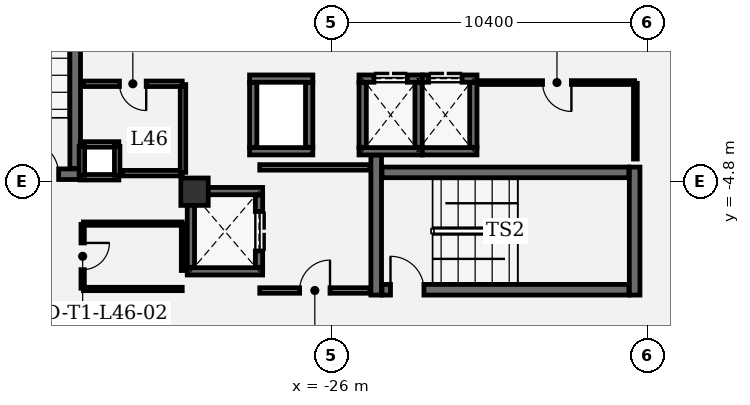
"""IFC4 building model, lengths in metres.
Left out: names, types, materials, properties, quantities, classifications, styles, units other than length and angle.
Written with IfcOpenShell. Run it as: python <this file> out.ifc"""

import sys

from ifc_helpers import new_model, si_unit, direction, frame, frame_2d, origin, origin_2d, place, context, subcontext, project, spatial, rectangle, extrude, element, fill, save


model = new_model("IFC4")
c1 = context("Model", 3, precision=1e-05, world=origin(), true_north=direction((0.0, 1.0)))
c2 = subcontext(c1, "Body", "Model", "MODEL_VIEW")
j1 = project(units=[si_unit("LENGTHUNIT", "METRE"), si_unit("PLANEANGLEUNIT", "RADIAN")], contexts=[c1])
p1 = place(None, origin())
s1 = spatial("IfcSite", under=j1, at=p1, CompositionType="ELEMENT")
p2 = place(p1, origin())
s2 = spatial("IfcBuilding", under=s1, at=p2, CompositionType="ELEMENT")
p3 = place(p2, frame((0.0, 0.0, 201.0)))
s3 = spatial("IfcBuildingStorey", under=s2, at=p3, CompositionType="ELEMENT", Elevation=201.0)
p4 = place(p3, frame((-30.5, -5.15, 0.0), z_axis=(0.0, 0.0, 1.0), x_axis=(1.0, 0.0, 0.0)))
e1 = element("IfcColumn", 1, at=p4, inside=s3, PredefinedType="COLUMN", context=c2, shape_type="SweptSolid", body=[
    extrude(rectangle(XDim=0.9, YDim=0.9, at=origin_2d()), origin(), (0.0, 0.0, 1.0), 4.05),
])
p5 = place(p3, frame((-24.525, -3.94, 0.0), z_axis=(0.0, 0.0, 1.0), x_axis=(0.0, -1.0, 0.0)))
e2 = element("IfcWall", 2, at=p5, inside=s3, PredefinedType="SHEAR", context=c2, shape_type="SweptSolid", body=[
    extrude(rectangle(XDim=4.61, YDim=0.35, at=frame_2d((2.305, 0.0))), origin(), (0.0, 0.0, 1.0), 3.78),
])
p6 = place(p3, frame((-16.025, -8.55, 0.0), z_axis=(0.0, 0.0, 1.0), x_axis=(0.0, 1.0, 0.0)))
e3 = element("IfcWall", 3, at=p6, inside=s3, PredefinedType="SHEAR", context=c2, shape_type="SweptSolid", body=[
    extrude(rectangle(XDim=4.21, YDim=0.35, at=frame_2d((2.105, 0.0))), origin(), (0.0, 0.0, 1.0), 3.78),
])
p7 = place(p3, frame((-24.335, -8.375, 0.0), z_axis=(0.0, 0.0, 1.0), x_axis=(1.0, 0.0, 0.0)))
e4 = element("IfcWall", 4, at=p7, inside=s3, PredefinedType="SHEAR", context=c2, shape_type="SweptSolid", body=[
    extrude(rectangle(XDim=8.12, YDim=0.35, at=frame_2d((4.06, 0.0))), origin(), (0.0, 0.0, 1.0), 3.78),
])
p8 = place(p7, frame((0.28, 0.0, 0.0)))
e5 = element("IfcOpeningElement", 5, at=p8, cuts=e4, PredefinedType="OPENING", context=c2, shape_type="SweptSolid", body=[
    extrude(rectangle(XDim=1.1, YDim=2.2, at=frame_2d((0.55, 1.1))), frame((0.0, 0.185, 0.0), z_axis=(0.0, -1.0, 0.0), x_axis=(1.0, 0.0, 0.0)), (0.0, 0.0, 1.0), 0.37),
])
p9 = place(p3, frame((-16.215, -4.515, 0.0), z_axis=(0.0, 0.0, 1.0), x_axis=(-1.0, 0.0, 0.0)))
e6 = element("IfcWall", 6, at=p9, inside=s3, PredefinedType="SHEAR", context=c2, shape_type="SweptSolid", body=[
    extrude(rectangle(XDim=8.12, YDim=0.35, at=frame_2d((4.06, 0.0))), origin(), (0.0, 0.0, 1.0), 3.78),
])
p10 = place(p3, frame((-38.46, -4.575, 0.0), z_axis=(0.0, 0.0, 1.0), x_axis=(1.0, 0.0, 0.0)))
e7 = element("IfcWall", 7, at=p10, inside=s3, PredefinedType="SHEAR", context=c2, shape_type="SweptSolid", body=[
    extrude(rectangle(XDim=4.21, YDim=0.35, at=frame_2d((2.105, 0.0))), origin(), (0.0, 0.0, 1.0), 3.78),
])
p11 = place(p10, frame((2.39, 0.0, 0.0)))
e8 = element("IfcOpeningElement", 8, at=p11, cuts=e7, PredefinedType="OPENING", context=c2, shape_type="SweptSolid", body=[
    extrude(rectangle(XDim=1.1, YDim=2.2, at=frame_2d((0.55, 1.1))), frame((0.0, 0.185, 0.0), z_axis=(0.0, -1.0, 0.0), x_axis=(1.0, 0.0, 0.0)), (0.0, 0.0, 1.0), 0.37),
])
p12 = place(p3, frame((-34.425, -4.385, 0.0), z_axis=(0.0, 0.0, 1.0), x_axis=(0.0, 1.0, 0.0)))
e9 = element("IfcWall", 9, at=p12, inside=s3, PredefinedType="SHEAR", context=c2, shape_type="SweptSolid", body=[
    extrude(rectangle(XDim=8.77, YDim=0.35, at=frame_2d((4.385, 0.0))), origin(), (0.0, 0.0, 1.0), 3.78),
])
for number, where, z_axis, x_axis in (
    (10, (-28.26, -7.77, 0.0), (0.0, 0.0, 1.0), (-1.0, 0.0, 0.0)),
    (11, (-30.74, -5.13, 0.0), (0.0, 0.0, 1.0), (1.0, 0.0, 0.0)),
):
    element("IfcWall", number, at=place(p3, frame(where, z_axis=z_axis, x_axis=x_axis)), inside=s3, PredefinedType="SHEAR", context=c2, shape_type="SweptSolid", body=[
        extrude(rectangle(XDim=2.48, YDim=0.24, at=frame_2d((1.24, 0.0))), origin(), (0.0, 0.0, 1.0), 3.78),
    ])
p13 = place(p3, frame((-30.62, -7.638, 0.0), z_axis=(0.0, 0.0, 1.0), x_axis=(0.0, 1.0, 0.0)))
e12 = element("IfcWall", 12, at=p13, inside=s3, PredefinedType="SHEAR", context=c2, shape_type="SweptSolid", body=[
    extrude(rectangle(XDim=2.376, YDim=0.24, at=frame_2d((1.188, 0.0))), origin(), (0.0, 0.0, 1.0), 3.78),
])
p14 = place(p3, frame((-28.38, -5.262, 0.0), z_axis=(0.0, 0.0, 1.0), x_axis=(0.0, -1.0, 0.0)))
e13 = element("IfcWall", 13, at=p14, inside=s3, PredefinedType="SHEAR", context=c2, shape_type="SweptSolid", body=[
    extrude(rectangle(XDim=2.376, YDim=0.24, at=frame_2d((1.188, 0.0))), origin(), (0.0, 0.0, 1.0), 3.78),
])
p15 = place(p14, frame((0.538, 0.0, 0.0)))
e14 = element("IfcOpeningElement", 14, at=p15, cuts=e13, PredefinedType="OPENING", context=c2, shape_type="SweptSolid", body=[
    extrude(rectangle(XDim=1.3, YDim=2.3, at=frame_2d((0.65, 1.15))), frame((0.0, 0.13, 0.0), z_axis=(0.0, -1.0, 0.0), x_axis=(1.0, 0.0, 0.0)), (0.0, 0.0, 1.0), 0.26),
])
for number, where, z_axis, x_axis in (
    (15, (-26.61, -3.82, 0.0), (0.0, 0.0, 1.0), (-1.0, 0.0, 0.0)),
    (16, (-28.69, -1.43, 0.0), (0.0, 0.0, 1.0), (1.0, 0.0, 0.0)),
):
    element("IfcWall", number, at=place(p3, frame(where, z_axis=z_axis, x_axis=x_axis)), inside=s3, PredefinedType="SHEAR", context=c2, shape_type="SweptSolid", body=[
        extrude(rectangle(XDim=2.08, YDim=0.24, at=frame_2d((1.04, 0.0))), origin(), (0.0, 0.0, 1.0), 3.78),
    ])
for number, where, z_axis, x_axis in (
    (17, (-28.57, -3.688, 0.0), (0.0, 0.0, 1.0), (0.0, 1.0, 0.0)),
    (18, (-26.73, -1.562, 0.0), (0.0, 0.0, 1.0), (0.0, -1.0, 0.0)),
):
    element("IfcWall", number, at=place(p3, frame(where, z_axis=z_axis, x_axis=x_axis)), inside=s3, PredefinedType="SHEAR", context=c2, shape_type="SweptSolid", body=[
        extrude(rectangle(XDim=2.126, YDim=0.24, at=frame_2d((1.063, 0.0))), origin(), (0.0, 0.0, 1.0), 3.78),
    ])
p16 = place(p3, frame((-23.01, -3.82, 0.0), z_axis=(0.0, 0.0, 1.0), x_axis=(-1.0, 0.0, 0.0)))
e19 = element("IfcWall", 19, at=p16, inside=s3, PredefinedType="SHEAR", context=c2, shape_type="SweptSolid", body=[
    extrude(rectangle(XDim=2.08, YDim=0.24, at=frame_2d((1.04, 0.0))), origin(), (0.0, 0.0, 1.0), 3.78),
])
p17 = place(p3, frame((-25.09, -1.43, 0.0), z_axis=(0.0, 0.0, 1.0), x_axis=(1.0, 0.0, 0.0)))
e20 = element("IfcWall", 20, at=p17, inside=s3, PredefinedType="SHEAR", context=c2, shape_type="SweptSolid", body=[
    extrude(rectangle(XDim=2.08, YDim=0.24, at=frame_2d((1.04, 0.0))), origin(), (0.0, 0.0, 1.0), 3.78),
])
p18 = place(p17, frame((0.49, 0.0, 0.0)))
e21 = element("IfcOpeningElement", 21, at=p18, cuts=e20, PredefinedType="OPENING", context=c2, shape_type="SweptSolid", body=[
    extrude(rectangle(XDim=1.1, YDim=2.2, at=frame_2d((0.55, 1.1))), frame((0.0, 0.13, 0.0), z_axis=(0.0, -1.0, 0.0), x_axis=(1.0, 0.0, 0.0)), (0.0, 0.0, 1.0), 0.26),
])
for number, where, z_axis, x_axis in (
    (22, (-24.97, -3.688, 0.0), (0.0, 0.0, 1.0), (0.0, 1.0, 0.0)),
    (23, (-23.13, -1.562, 0.0), (0.0, 0.0, 1.0), (0.0, -1.0, 0.0)),
):
    element("IfcWall", number, at=place(p3, frame(where, z_axis=z_axis, x_axis=x_axis)), inside=s3, PredefinedType="SHEAR", context=c2, shape_type="SweptSolid", body=[
        extrude(rectangle(XDim=2.126, YDim=0.24, at=frame_2d((1.063, 0.0))), origin(), (0.0, 0.0, 1.0), 3.78),
    ])
p19 = place(p3, frame((-21.21, -3.82, 0.0), z_axis=(0.0, 0.0, 1.0), x_axis=(-1.0, 0.0, 0.0)))
e24 = element("IfcWall", 24, at=p19, inside=s3, PredefinedType="SHEAR", context=c2, shape_type="SweptSolid", body=[
    extrude(rectangle(XDim=1.8, YDim=0.24, at=frame_2d((0.9, 0.0))), origin(), (0.0, 0.0, 1.0), 3.78),
])
p20 = place(p3, frame((-23.01, -1.43, 0.0), z_axis=(0.0, 0.0, 1.0), x_axis=(1.0, 0.0, 0.0)))
e25 = element("IfcWall", 25, at=p20, inside=s3, PredefinedType="SHEAR", context=c2, shape_type="SweptSolid", body=[
    extrude(rectangle(XDim=1.8, YDim=0.24, at=frame_2d((0.9, 0.0))), origin(), (0.0, 0.0, 1.0), 3.78),
])
p21 = place(p20, frame((0.21, 0.0, 0.0)))
e26 = element("IfcOpeningElement", 26, at=p21, cuts=e25, PredefinedType="OPENING", context=c2, shape_type="SweptSolid", body=[
    extrude(rectangle(XDim=1.1, YDim=2.2, at=frame_2d((0.55, 1.1))), frame((0.0, 0.13, 0.0), z_axis=(0.0, -1.0, 0.0), x_axis=(1.0, 0.0, 0.0)), (0.0, 0.0, 1.0), 0.26),
])
p22 = place(p3, frame((-21.33, -1.562, 0.0), z_axis=(0.0, 0.0, 1.0), x_axis=(0.0, -1.0, 0.0)))
e27 = element("IfcWall", 27, at=p22, inside=s3, PredefinedType="SHEAR", context=c2, shape_type="SweptSolid", body=[
    extrude(rectangle(XDim=2.126, YDim=0.24, at=frame_2d((1.063, 0.0))), origin(), (0.0, 0.0, 1.0), 3.78),
])
for number, where, z_axis, x_axis in (
    (28, (-32.99, -4.675, 0.0), (0.0, 0.0, 1.0), (-1.0, 0.0, 0.0)),
    (29, (-34.26, -3.595, 0.0), (0.0, 0.0, 1.0), (1.0, 0.0, 0.0)),
):
    element("IfcWall", number, at=place(p3, frame(where, z_axis=z_axis, x_axis=x_axis)), inside=s3, PredefinedType="PARTITIONING", context=c2, shape_type="SweptSolid", body=[
        extrude(rectangle(XDim=1.27, YDim=0.18, at=frame_2d((0.635, 0.0))), origin(), (0.0, 0.0, 1.0), 3.78),
    ])
for number, where, z_axis, x_axis in (
    (30, (-34.205, -4.61, 0.0), (0.0, 0.0, 1.0), (0.0, 1.0, 0.0)),
    (31, (-33.045, -3.66, 0.0), (0.0, 0.0, 1.0), (0.0, -1.0, 0.0)),
):
    element("IfcWall", number, at=place(p3, frame(where, z_axis=z_axis, x_axis=x_axis)), inside=s3, PredefinedType="PARTITIONING", context=c2, shape_type="SweptSolid", body=[
        extrude(rectangle(XDim=0.95, YDim=0.18, at=frame_2d((0.475, 0.0))), origin(), (0.0, 0.0, 1.0), 3.78),
    ])
p23 = place(p3, frame((-28.355, -8.4, 0.0), z_axis=(0.0, 0.0, 1.0), x_axis=(1.0, 0.0, 0.0)))
e32 = element("IfcWall", 32, at=p23, inside=s3, PredefinedType="PARTITIONING", context=c2, shape_type="SweptSolid", body=[
    extrude(rectangle(XDim=3.622, YDim=0.18, at=frame_2d((1.811, 0.0))), origin(), (0.0, 0.0, 1.0), 3.78),
])
p24 = place(p23, frame((1.311, 0.0, 0.0)))
e33 = element("IfcOpeningElement", 33, at=p24, cuts=e32, PredefinedType="OPENING", context=c2, shape_type="SweptSolid", body=[
    extrude(rectangle(XDim=1.0, YDim=2.15, at=frame_2d((0.5, 1.075))), frame((0.0, 0.1, 0.0), z_axis=(0.0, -1.0, 0.0), x_axis=(1.0, 0.0, 0.0)), (0.0, 0.0, 1.0), 0.2),
])
p25 = place(p3, frame((-24.733, -4.35, 0.0), z_axis=(0.0, 0.0, 1.0), x_axis=(-1.0, 0.0, 0.0)))
e34 = element("IfcWall", 34, at=p25, inside=s3, PredefinedType="PARTITIONING", context=c2, shape_type="SweptSolid", body=[
    extrude(rectangle(XDim=3.622, YDim=0.18, at=frame_2d((1.811, 0.0))), origin(), (0.0, 0.0, 1.0), 3.78),
])
p26 = place(p3, frame((-34.18, -6.225, 0.0), z_axis=(0.0, 0.0, 1.0), x_axis=(0.0, -1.0, 0.0)))
e35 = element("IfcWall", 35, at=p26, inside=s3, PredefinedType="PARTITIONING", context=c2, shape_type="SweptSolid", body=[
    extrude(rectangle(XDim=2.1, YDim=0.11, at=frame_2d((1.05, 0.0))), origin(), (0.0, 0.0, 1.0), 3.78),
])
p27 = place(p26, frame((0.61, 0.0, 0.0)))
e36 = element("IfcOpeningElement", 36, at=p27, cuts=e35, PredefinedType="OPENING", context=c2, shape_type="SweptSolid", body=[
    extrude(rectangle(XDim=0.88, YDim=2.1, at=frame_2d((0.44, 1.05))), frame((0.0, 0.065, 0.0), z_axis=(0.0, -1.0, 0.0), x_axis=(1.0, 0.0, 0.0)), (0.0, 0.0, 1.0), 0.13),
])
p28 = place(p3, frame((-34.155, -8.35, 0.0), z_axis=(0.0, 0.0, 1.0), x_axis=(1.0, 0.0, 0.0)))
e37 = element("IfcWall", 37, at=p28, inside=s3, PredefinedType="PARTITIONING", context=c2, shape_type="SweptSolid", body=[
    extrude(rectangle(XDim=3.25, YDim=0.11, at=frame_2d((1.625, 0.0))), origin(), (0.0, 0.0, 1.0), 3.344),
])
p29 = place(p3, frame((-30.88, -7.743, 0.0), z_axis=(0.0, 0.0, 1.0), x_axis=(0.0, 1.0, 0.0)))
e38 = element("IfcWall", 38, at=p29, inside=s3, PredefinedType="PARTITIONING", context=c2, shape_type="SweptSolid", body=[
    extrude(rectangle(XDim=1.518, YDim=0.11, at=frame_2d((0.759, 0.0))), origin(), (0.0, 0.0, 1.0), 3.78),
])
p30 = place(p3, frame((-30.905, -6.2, 0.0), z_axis=(0.0, 0.0, 1.0), x_axis=(-1.0, 0.0, 0.0)))
e39 = element("IfcWall", 39, at=p30, inside=s3, PredefinedType="PARTITIONING", context=c2, shape_type="SweptSolid", body=[
    extrude(rectangle(XDim=3.25, YDim=0.11, at=frame_2d((1.625, 0.0))), origin(), (0.0, 0.0, 1.0), 3.344),
])
p31 = place(p3, frame((-16.0, -4.075, 0.0), z_axis=(0.0, 0.0, 1.0), x_axis=(0.0, 1.0, 0.0)))
e40 = element("IfcWall", 40, at=p31, inside=s3, PredefinedType="PARTITIONING", context=c2, shape_type="SweptSolid", body=[
    extrude(rectangle(XDim=2.49, YDim=0.125, at=frame_2d((1.245, 0.0))), origin(), (0.0, 0.0, 1.0), 3.78),
])
p32 = place(p3, frame((-16.025, -1.56, 0.0), z_axis=(0.0, 0.0, 1.0), x_axis=(-1.0, 0.0, 0.0)))
e41 = element("IfcWall", 41, at=p32, inside=s3, PredefinedType="PARTITIONING", context=c2, shape_type="SweptSolid", body=[
    extrude(rectangle(XDim=5.109, YDim=0.125, at=frame_2d((2.554, 0.0))), origin(), (0.0, 0.0, 1.0), 3.78),
])
p33 = place(p32, frame((2.079, 0.0, 0.0)))
e42 = element("IfcOpeningElement", 42, at=p33, cuts=e41, PredefinedType="OPENING", context=c2, shape_type="SweptSolid", body=[
    extrude(rectangle(XDim=0.95, YDim=2.15, at=frame_2d((0.475, 1.075))), frame((0.0, 0.073, 0.0), z_axis=(0.0, -1.0, 0.0), x_axis=(1.0, 0.0, 0.0)), (0.0, 0.0, 1.0), 0.145),
])
p34 = place(p3, frame((-32.88, -4.54, 0.0), z_axis=(0.0, 0.0, 1.0), x_axis=(1.0, 0.0, 0.0)))
e43 = element("IfcWall", 43, at=p34, inside=s3, PredefinedType="PARTITIONING", context=c2, shape_type="SweptSolid", body=[
    extrude(rectangle(XDim=1.975, YDim=0.18, at=frame_2d((0.988, 0.0))), origin(), (0.0, 0.0, 1.0), 3.78),
])
p35 = place(p3, frame((-30.88, -4.515, 0.0), z_axis=(0.0, 0.0, 1.0), x_axis=(0.0, 1.0, 0.0)))
e44 = element("IfcWall", 44, at=p35, inside=s3, PredefinedType="PARTITIONING", context=c2, shape_type="SweptSolid", body=[
    extrude(rectangle(XDim=2.89, YDim=0.18, at=frame_2d((1.445, 0.0))), origin(), (0.0, 0.0, 1.0), 3.78),
])
p36 = place(p3, frame((-30.905, -1.6, 0.0), z_axis=(0.0, 0.0, 1.0), x_axis=(-1.0, 0.0, 0.0)))
e45 = element("IfcWall", 45, at=p36, inside=s3, PredefinedType="PARTITIONING", context=c2, shape_type="SweptSolid", body=[
    extrude(rectangle(XDim=3.25, YDim=0.18, at=frame_2d((1.625, 0.0))), origin(), (0.0, 0.0, 1.0), 3.78),
])
p37 = place(p36, frame((1.185, 0.0, 0.0)))
e46 = element("IfcOpeningElement", 46, at=p37, cuts=e45, PredefinedType="OPENING", context=c2, shape_type="SweptSolid", body=[
    extrude(rectangle(XDim=0.88, YDim=2.1, at=frame_2d((0.44, 1.05))), frame((0.0, 0.1, 0.0), z_axis=(0.0, -1.0, 0.0), x_axis=(1.0, 0.0, 0.0)), (0.0, 0.0, 1.0), 0.2),
])
p38 = place(p8, origin())
e47 = element("IfcDoor", 47, at=p38, inside=s3, OperationType="SINGLE_SWING_LEFT", PredefinedType="DOOR", context=c2, shape_type="SweptSolid", body=[
    extrude(rectangle(XDim=1.1, YDim=2.2, at=frame_2d((0.55, 1.1))), frame((0.0, 0.025, 0.0), z_axis=(0.0, -1.0, 0.0), x_axis=(1.0, 0.0, 0.0)), (0.0, 0.0, 1.0), 0.05),
])
fill(e5, e47)
p39 = place(p11, origin())
e48 = element("IfcDoor", 48, at=p39, inside=s3, OperationType="SINGLE_SWING_LEFT", PredefinedType="DOOR", context=c2, shape_type="SweptSolid", body=[
    extrude(rectangle(XDim=1.1, YDim=2.2, at=frame_2d((0.55, 1.1))), frame((0.0, 0.025, 0.0), z_axis=(0.0, -1.0, 0.0), x_axis=(1.0, 0.0, 0.0)), (0.0, 0.0, 1.0), 0.05),
])
fill(e8, e48)
p40 = place(p15, origin())
e49 = element("IfcDoor", 49, at=p40, inside=s3, OperationType="DOUBLE_DOOR_SLIDING", PredefinedType="DOOR", context=c2, shape_type="SweptSolid", body=[
    extrude(rectangle(XDim=1.3, YDim=2.3, at=frame_2d((0.65, 1.15))), frame((0.0, 0.025, 0.0), z_axis=(0.0, -1.0, 0.0), x_axis=(1.0, 0.0, 0.0)), (0.0, 0.0, 1.0), 0.05),
])
fill(e14, e49)
p41 = place(p18, origin())
e50 = element("IfcDoor", 50, at=p41, inside=s3, OperationType="DOUBLE_DOOR_SLIDING", PredefinedType="DOOR", context=c2, shape_type="SweptSolid", body=[
    extrude(rectangle(XDim=1.1, YDim=2.2, at=frame_2d((0.55, 1.1))), frame((0.0, 0.025, 0.0), z_axis=(0.0, -1.0, 0.0), x_axis=(1.0, 0.0, 0.0)), (0.0, 0.0, 1.0), 0.05),
])
fill(e21, e50)
p42 = place(p21, origin())
e51 = element("IfcDoor", 51, at=p42, inside=s3, OperationType="DOUBLE_DOOR_SLIDING", PredefinedType="DOOR", context=c2, shape_type="SweptSolid", body=[
    extrude(rectangle(XDim=1.1, YDim=2.2, at=frame_2d((0.55, 1.1))), frame((0.0, 0.025, 0.0), z_axis=(0.0, -1.0, 0.0), x_axis=(1.0, 0.0, 0.0)), (0.0, 0.0, 1.0), 0.05),
])
fill(e26, e51)
p43 = place(p27, origin())
e52 = element("IfcDoor", 52, at=p43, inside=s3, OperationType="SINGLE_SWING_LEFT", PredefinedType="DOOR", context=c2, shape_type="SweptSolid", body=[
    extrude(rectangle(XDim=0.88, YDim=2.1, at=frame_2d((0.44, 1.05))), frame((0.0, 0.025, 0.0), z_axis=(0.0, -1.0, 0.0), x_axis=(1.0, 0.0, 0.0)), (0.0, 0.0, 1.0), 0.05),
])
fill(e36, e52)
p44 = place(p33, origin())
e53 = element("IfcDoor", 53, at=p44, inside=s3, OperationType="SINGLE_SWING_LEFT", PredefinedType="DOOR", context=c2, shape_type="SweptSolid", body=[
    extrude(rectangle(XDim=0.95, YDim=2.15, at=frame_2d((0.475, 1.075))), frame((0.0, 0.025, 0.0), z_axis=(0.0, -1.0, 0.0), x_axis=(1.0, 0.0, 0.0)), (0.0, 0.0, 1.0), 0.05),
])
fill(e42, e53)
p45 = place(p37, origin())
e54 = element("IfcDoor", 54, at=p45, inside=s3, OperationType="SINGLE_SWING_LEFT", PredefinedType="DOOR", context=c2, shape_type="SweptSolid", body=[
    extrude(rectangle(XDim=0.88, YDim=2.1, at=frame_2d((0.44, 1.05))), frame((0.0, 0.025, 0.0), z_axis=(0.0, -1.0, 0.0), x_axis=(1.0, 0.0, 0.0)), (0.0, 0.0, 1.0), 0.05),
])
fill(e46, e54)
p46 = place(p24, origin())
e55 = element("IfcDoor", 55, at=p46, inside=s3, OperationType="SINGLE_SWING_RIGHT", PredefinedType="DOOR", context=c2, shape_type="SweptSolid", body=[
    extrude(rectangle(XDim=1.0, YDim=2.15, at=frame_2d((0.5, 1.075))), frame((0.0, 0.025, 0.0), z_axis=(0.0, -1.0, 0.0), x_axis=(1.0, 0.0, 0.0)), (0.0, 0.0, 1.0), 0.05),
])
fill(e33, e55)
save(model, sys.argv[1])
